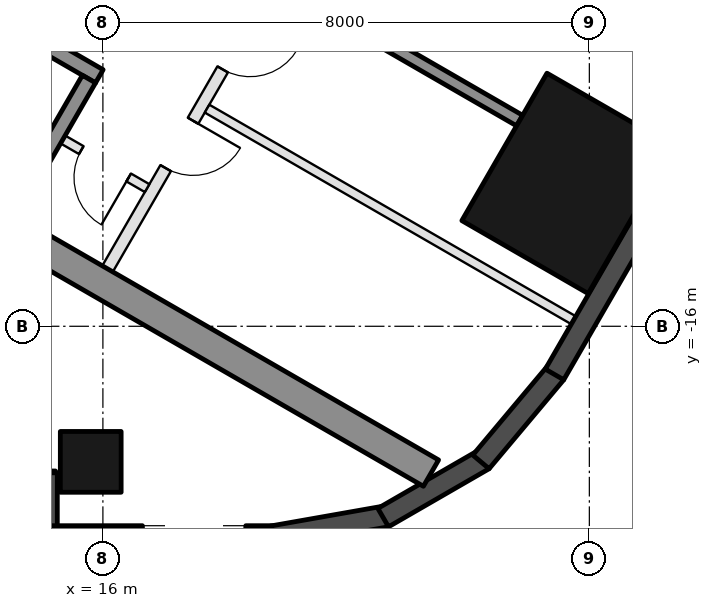
"""IFC4 building model, lengths in metres.
Left out: names, types, materials, properties, quantities, classifications, styles, units other than length and angle.
Written with IfcOpenShell. Run it as: python <this file> out.ifc"""

import sys

from ifc_helpers import new_model, si_unit, direction, frame, frame_2d, origin, origin_2d, place, context, subcontext, project, spatial, rectangle, hollow_rectangle, extrude, element, fill, save


model = new_model("IFC4")
c1 = context("Model", 3, precision=1e-05, world=origin(), true_north=direction((0.0, 1.0)))
c2 = subcontext(c1, "Body", "Model", "MODEL_VIEW")
j1 = project(units=[si_unit("LENGTHUNIT", "METRE"), si_unit("PLANEANGLEUNIT", "RADIAN")], contexts=[c1])
p1 = place(None, origin())
s1 = spatial("IfcSite", under=j1, at=p1, CompositionType="ELEMENT")
p2 = place(p1, origin())
s2 = spatial("IfcBuilding", under=s1, at=p2, CompositionType="ELEMENT")
p3 = place(p2, frame((0.0, 0.0, 50.2)))
s3 = spatial("IfcBuildingStorey", under=s2, at=p3, CompositionType="ELEMENT", Elevation=50.2)
p4 = place(p3, frame((15.8, -18.23, 0.0), z_axis=(0.0, 0.0, 1.0), x_axis=(-1.0, 0.0, 0.0)))
e1 = element("IfcColumn", 1, at=p4, inside=s3, PredefinedType="COLUMN", context=c2, shape_type="SweptSolid", body=[
    extrude(hollow_rectangle(XDim=1.0, YDim=1.0, WallThickness=0.045, at=origin_2d()), origin(), (0.0, 0.0, 1.0), 3.7),
])
p5 = place(p3, frame((23.643, -13.65, 0.0), z_axis=(0.0, 0.0, 1.0), x_axis=(0.5, 0.866025403784, 0.0)))
e2 = element("IfcColumn", 2, at=p5, inside=s3, PredefinedType="COLUMN", context=c2, shape_type="SweptSolid", body=[
    extrude(hollow_rectangle(XDim=2.8, YDim=2.4, WallThickness=0.07, at=origin_2d()), origin(), (0.0, 0.0, 1.0), 3.7),
])
p6 = place(p3, frame((8.48, -18.555, 0.0), z_axis=(0.0, 0.0, 1.0), x_axis=(1.0, 0.0, 0.0)))
e3 = element("IfcWall", 3, at=p6, inside=s3, PredefinedType="SOLIDWALL", context=c2, shape_type="SweptSolid", body=[
    extrude(rectangle(XDim=6.74, YDim=0.35, at=frame_2d((3.37, 0.0))), origin(), (0.0, 0.0, 1.0), 3.55),
])
p7 = place(p6, frame((0.77, 0.0, 0.0)))
e4 = element("IfcOpeningElement", 4, at=p7, cuts=e3, PredefinedType="OPENING", context=c2, shape_type="SweptSolid", body=[
    extrude(rectangle(XDim=2.4, YDim=2.4, at=frame_2d((1.2, 1.2))), frame((0.0, 0.185, 0.0), z_axis=(0.0, -1.0, 0.0), x_axis=(1.0, 0.0, 0.0)), (0.0, 0.0, 1.0), 0.37),
])
p8 = place(p6, frame((3.47, 0.0, 0.3)))
e5 = element("IfcOpeningElement", 5, at=p8, cuts=e3, PredefinedType="OPENING", context=c2, shape_type="SweptSolid", body=[
    extrude(rectangle(XDim=2.5, YDim=2.65, at=frame_2d((1.25, 1.325))), frame((0.0, 0.185, 0.0), z_axis=(0.0, -1.0, 0.0), x_axis=(1.0, 0.0, 0.0)), (0.0, 0.0, 1.0), 0.37),
])
p9 = place(p3, frame((15.075, -18.41, 0.0), z_axis=(0.0, 0.0, 1.0), x_axis=(0.0, -1.0, 0.0)))
e6 = element("IfcWall", 6, at=p9, inside=s3, PredefinedType="SOLIDWALL", context=c2, shape_type="SweptSolid", body=[
    extrude(rectangle(XDim=1.22, YDim=0.35, at=frame_2d((0.61, 0.0))), origin(), (0.0, 0.0, 1.0), 3.55),
])
p10 = place(p3, frame((14.9, -19.455, 0.0), z_axis=(0.0, 0.0, 1.0), x_axis=(1.0, 0.0, 0.0)))
e7 = element("IfcWall", 7, at=p10, inside=s3, PredefinedType="SOLIDWALL", context=c2, shape_type="SweptSolid", body=[
    extrude(rectangle(XDim=3.916, YDim=0.35, at=frame_2d((1.958, 0.0))), origin(), (0.0, 0.0, 1.0), 3.55),
])
p11 = place(p10, frame((1.75, 0.0, 0.3)))
e8 = element("IfcOpeningElement", 8, at=p11, cuts=e7, PredefinedType="OPENING", context=c2, shape_type="SweptSolid", body=[
    extrude(rectangle(XDim=1.7, YDim=2.65, at=frame_2d((0.85, 1.325))), frame((0.0, 0.185, 0.0), z_axis=(0.0, -1.0, 0.0), x_axis=(1.0, 0.0, 0.0)), (0.0, 0.0, 1.0), 0.37),
])
p12 = place(p3, frame((18.785, -19.458, 0.0), z_axis=(0.0, 0.0, 1.0), x_axis=(0.984798995425, 0.173697837091, 0.0)))
e9 = element("IfcWall", 9, at=p12, inside=s3, PredefinedType="SOLIDWALL", context=c2, shape_type="SweptSolid", body=[
    extrude(rectangle(XDim=1.91, YDim=0.35, at=frame_2d((0.955, 0.0))), origin(), (0.0, 0.0, 1.0), 3.55),
])
for number, where, z_axis, x_axis in (
    (10, (20.61, -19.147, 0.0), (0.0, 0.0, 1.0), (0.866, 0.5, 0.0)),
    (11, (22.217, -18.231, 0.0), (0.0, 0.0, 1.0), (0.643, 0.766, 0.0)),
):
    element("IfcWall", number, at=place(p3, frame(where, z_axis=z_axis, x_axis=x_axis)), inside=s3, PredefinedType="SOLIDWALL", context=c2, shape_type="SweptSolid", body=[
        extrude(rectangle(XDim=1.91, YDim=0.35, at=frame_2d((0.955, 0.0))), origin(), (0.0, 0.0, 1.0), 3.55),
    ])
p13 = place(p3, frame((23.427, -16.792, 0.0), z_axis=(0.0, 0.0, 1.0), x_axis=(0.500018773155, 0.866014564827, 0.0)))
e12 = element("IfcWall", 12, at=p13, inside=s3, PredefinedType="SOLIDWALL", context=c2, shape_type="SweptSolid", body=[
    extrude(rectangle(XDim=5.658, YDim=0.35, at=frame_2d((2.829, 0.0))), origin(), (0.0, 0.0, 1.0), 3.55),
])
p14 = place(p3, frame((8.547, -10.997, 0.0), z_axis=(0.0, 0.0, 1.0), x_axis=(0.866025009528, -0.500000682871, 0.0)))
e13 = element("IfcWall", 13, at=p14, inside=s3, PredefinedType="SHEAR", context=c2, shape_type="SweptSolid", body=[
    extrude(rectangle(XDim=14.837, YDim=0.5, at=frame_2d((7.418, 0.0))), origin(), (0.0, 0.0, 1.0), 3.5),
])
p15 = place(p3, frame((10.356, -8.664, 0.0), z_axis=(0.0, 0.0, 1.0), x_axis=(0.866028629588, -0.499994412703, 0.0)))
e14 = element("IfcWall", 14, at=p15, inside=s3, PredefinedType="SHEAR", context=c2, shape_type="SweptSolid", body=[
    extrude(rectangle(XDim=6.45, YDim=0.25, at=frame_2d((3.225, 0.0))), origin(), (0.0, 0.0, 1.0), 3.5),
])
p16 = place(p15, frame((0.3, 0.0, 0.0)))
e15 = element("IfcOpeningElement", 15, at=p16, cuts=e14, PredefinedType="OPENING", context=c2, shape_type="SweptSolid", body=[
    extrude(rectangle(XDim=1.0, YDim=2.1, at=frame_2d((0.5, 1.05))), frame((0.0, 0.135, 0.0), z_axis=(0.0, -1.0, 0.0), x_axis=(1.0, 0.0, 0.0)), (0.0, 0.0, 1.0), 0.27),
])
p17 = place(p3, frame((14.496, -14.143, 0.0), z_axis=(0.0, 0.0, 1.0), x_axis=(0.500062241894, 0.865989465428, 0.0)))
e16 = element("IfcWall", 16, at=p17, inside=s3, PredefinedType="SHEAR", context=c2, shape_type="SweptSolid", body=[
    extrude(rectangle(XDim=2.55, YDim=0.25, at=frame_2d((1.275, 0.0))), origin(), (0.0, 0.0, 1.0), 3.5),
])
p18 = place(p3, frame((20.567, -11.297, 0.0), z_axis=(0.0, 0.0, 1.0), x_axis=(0.866060851709, -0.499938597367, 0.0)))
e17 = element("IfcWall", 17, at=p18, inside=s3, PredefinedType="SHEAR", context=c2, shape_type="SweptSolid", body=[
    extrude(rectangle(XDim=2.64, YDim=0.2, at=frame_2d((1.32, 0.0))), origin(), (0.0, 0.0, 1.0), 3.5),
])
p19 = place(p3, frame((16.076, -15.055, 0.0), z_axis=(0.0, 0.0, 1.0), x_axis=(0.499995103361, 0.866028230842, 0.0)))
e18 = element("IfcWall", 18, at=p19, inside=s3, PredefinedType="PARTITIONING", context=c2, shape_type="SweptSolid", body=[
    extrude(rectangle(XDim=5.4, YDim=0.2, at=frame_2d((2.7, 0.0))), origin(), (0.0, 0.0, 1.0), 3.5),
])
p20 = place(p19, frame((1.913, 0.0, 0.0)))
e19 = element("IfcOpeningElement", 19, at=p20, cuts=e18, PredefinedType="OPENING", context=c2, shape_type="SweptSolid", body=[
    extrude(rectangle(XDim=0.9, YDim=2.1, at=frame_2d((0.45, 1.05))), frame((0.0, 0.11, 0.0), z_axis=(0.0, -1.0, 0.0), x_axis=(1.0, 0.0, 0.0)), (0.0, 0.0, 1.0), 0.22),
])
p21 = place(p19, frame((3.788, 0.0, 0.0)))
e20 = element("IfcOpeningElement", 20, at=p21, cuts=e18, PredefinedType="OPENING", context=c2, shape_type="SweptSolid", body=[
    extrude(rectangle(XDim=0.9, YDim=2.1, at=frame_2d((0.45, 1.05))), frame((0.0, 0.11, 0.0), z_axis=(0.0, -1.0, 0.0), x_axis=(1.0, 0.0, 0.0)), (0.0, 0.0, 1.0), 0.22),
])
p22 = place(p3, frame((15.342, -12.928, 0.0), z_axis=(0.0, 0.0, 1.0), x_axis=(0.865989903783, -0.500061482766, 0.0)))
e21 = element("IfcWall", 21, at=p22, inside=s3, PredefinedType="PARTITIONING", context=c2, shape_type="SweptSolid", body=[
    extrude(rectangle(XDim=1.6, YDim=0.15, at=frame_2d((0.8, 0.0))), origin(), (0.0, 0.0, 1.0), 3.5),
])
p23 = place(p22, frame((0.35, 0.0, 0.0)))
e22 = element("IfcOpeningElement", 22, at=p23, cuts=e21, PredefinedType="OPENING", context=c2, shape_type="SweptSolid", body=[
    extrude(rectangle(XDim=0.9, YDim=2.1, at=frame_2d((0.45, 1.05))), frame((0.0, 0.085, 0.0), z_axis=(0.0, -1.0, 0.0), x_axis=(1.0, 0.0, 0.0)), (0.0, 0.0, 1.0), 0.17),
])
p24 = place(p3, frame((17.713, -12.42, 0.0), z_axis=(0.0, 0.0, 1.0), x_axis=(0.866016523273, -0.500015381182, 0.0)))
e23 = element("IfcWall", 23, at=p24, inside=s3, PredefinedType="PARTITIONING", context=c2, shape_type="SweptSolid", body=[
    extrude(rectangle(XDim=6.95, YDim=0.15, at=frame_2d((3.475, 0.0))), origin(), (0.0, 0.0, 1.0), 3.5),
])
p25 = place(p23, frame((0.9, 0.0, 0.0), z_axis=(0.0, 0.0, 1.0), x_axis=(-1.0, 0.0, 0.0)))
e24 = element("IfcDoor", 24, at=p25, inside=s3, OperationType="SINGLE_SWING_LEFT", PredefinedType="DOOR", context=c2, shape_type="SweptSolid", body=[
    extrude(rectangle(XDim=0.9, YDim=2.1, at=frame_2d((0.45, 1.05))), frame((0.0, 0.025, 0.0), z_axis=(0.0, -1.0, 0.0), x_axis=(1.0, 0.0, 0.0)), (0.0, 0.0, 1.0), 0.05),
])
fill(e22, e24)
p26 = place(p20, frame((0.9, 0.0, 0.0), z_axis=(0.0, 0.0, 1.0), x_axis=(-1.0, 0.0, 0.0)))
e25 = element("IfcDoor", 25, at=p26, inside=s3, OperationType="SINGLE_SWING_LEFT", PredefinedType="DOOR", context=c2, shape_type="SweptSolid", body=[
    extrude(rectangle(XDim=0.9, YDim=2.1, at=frame_2d((0.45, 1.05))), frame((0.0, 0.025, 0.0), z_axis=(0.0, -1.0, 0.0), x_axis=(1.0, 0.0, 0.0)), (0.0, 0.0, 1.0), 0.05),
])
fill(e19, e25)
p27 = place(p21, frame((0.9, 0.0, 0.0), z_axis=(0.0, 0.0, 1.0), x_axis=(-1.0, 0.0, 0.0)))
e26 = element("IfcDoor", 26, at=p27, inside=s3, OperationType="SINGLE_SWING_LEFT", PredefinedType="DOOR", context=c2, shape_type="SweptSolid", body=[
    extrude(rectangle(XDim=0.9, YDim=2.1, at=frame_2d((0.45, 1.05))), frame((0.0, 0.025, 0.0), z_axis=(0.0, -1.0, 0.0), x_axis=(1.0, 0.0, 0.0)), (0.0, 0.0, 1.0), 0.05),
])
fill(e20, e26)
save(model, sys.argv[1])
